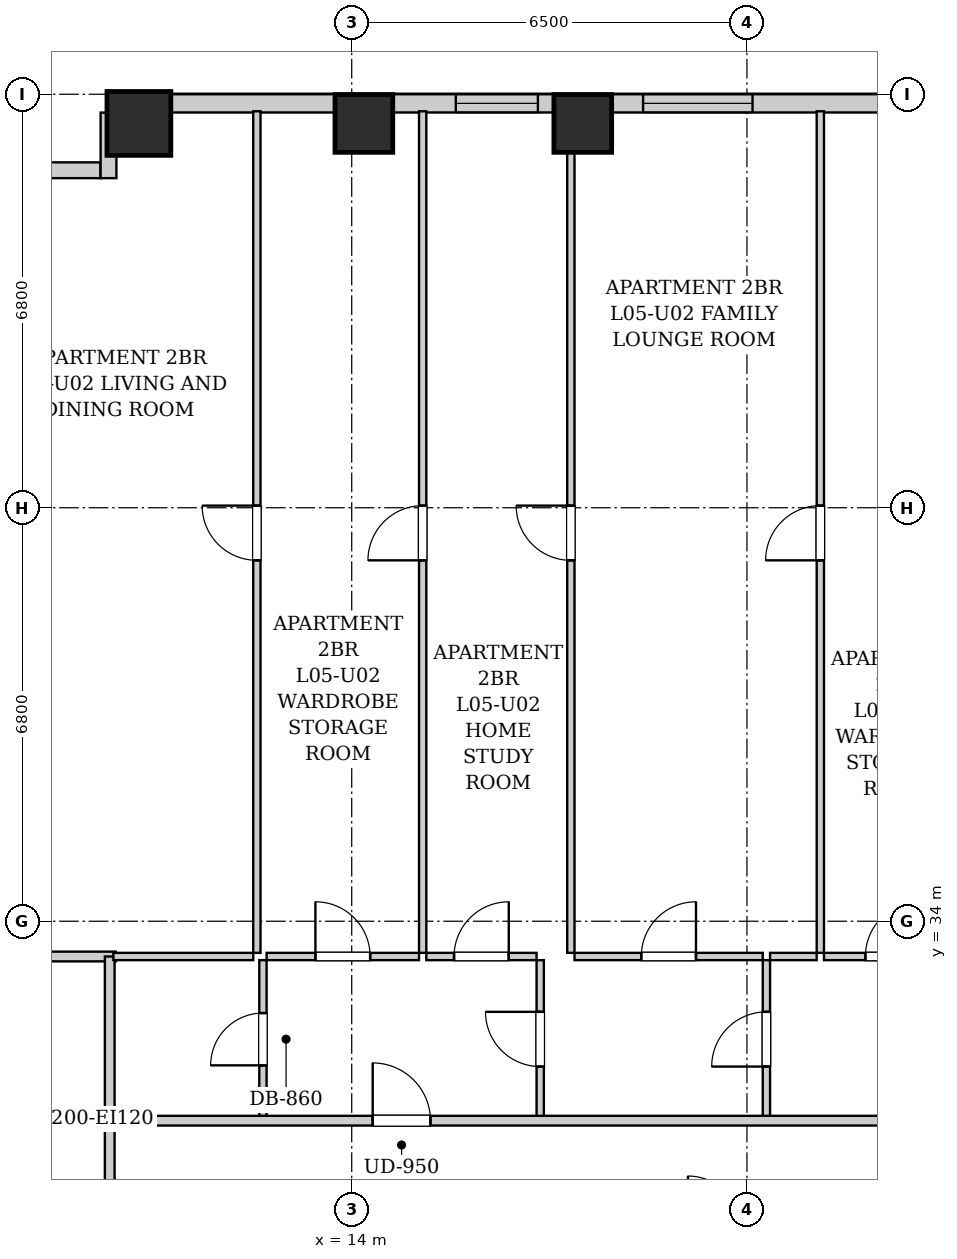
"""IFC4 building model, lengths in metres.
Left out: names, types, materials, properties, quantities, classifications, styles, units other than length and angle.
Written with IfcOpenShell. Run it as: python <this file> out.ifc"""

import sys

from ifc_helpers import new_model, si_unit, direction, frame, frame_2d, origin, origin_2d, place, context, subcontext, project, spatial, rectangle, extrude, element, fill, save


model = new_model("IFC4")
c1 = context("Model", 3, precision=1e-05, world=origin(), true_north=direction((0.0, 1.0)))
c2 = subcontext(c1, "Body", "Model", "MODEL_VIEW")
j1 = project(units=[si_unit("LENGTHUNIT", "METRE"), si_unit("PLANEANGLEUNIT", "RADIAN")], contexts=[c1])
p1 = place(None, origin())
s1 = spatial("IfcSite", under=j1, at=p1, CompositionType="ELEMENT")
p2 = place(p1, origin())
s2 = spatial("IfcBuilding", under=s1, at=p2, CompositionType="ELEMENT")
p3 = place(p2, frame((0.0, 0.0, 25.8)))
s3 = spatial("IfcBuildingStorey", under=s2, at=p3, CompositionType="ELEMENT", Elevation=25.8)
p4 = place(p3, frame((10.5, 47.12, 0.0), z_axis=(0.0, 0.0, 1.0), x_axis=(1.0, 0.0, 0.0)))
e1 = element("IfcColumn", 1, at=p4, inside=s3, PredefinedType="COLUMN", context=c2, shape_type="SweptSolid", body=[
    extrude(rectangle(XDim=1.05, YDim=1.05, at=origin_2d()), origin(), (0.0, 0.0, 1.0), 3.2),
])
for number, where, z_axis, x_axis in (
    (2, (14.2, 47.12, 0.0), (0.0, 0.0, 1.0), (1.0, 0.0, 0.0)),
    (3, (17.8, 47.12, 0.0), (0.0, 0.0, 1.0), (1.0, 0.0, 0.0)),
):
    element("IfcColumn", number, at=place(p3, frame(where, z_axis=z_axis, x_axis=x_axis)), inside=s3, PredefinedType="COLUMN", context=c2, shape_type="SweptSolid", body=[
        extrude(rectangle(XDim=0.95, YDim=0.95, at=origin_2d()), origin(), (0.0, 0.0, 1.0), 3.2),
    ])
p5 = place(p3, frame((10.0, 47.45, 0.0), z_axis=(0.0, 0.0, 1.0), x_axis=(1.0, 0.0, 0.0)))
e4 = element("IfcWall", 4, at=p5, inside=s3, PredefinedType="SOLIDWALL", context=c2, shape_type="SweptSolid", body=[
    extrude(rectangle(XDim=28.1, YDim=0.3, at=frame_2d((14.05, 0.0))), origin(), (0.0, 0.0, 1.0), 1.975),
])
p6 = place(p5, frame((5.712, 0.0, 0.55)))
e5 = element("IfcOpeningElement", 5, at=p6, cuts=e4, PredefinedType="OPENING", context=c2, shape_type="SweptSolid", body=[
    extrude(rectangle(XDim=1.35, YDim=1.2, at=frame_2d((0.675, 0.6))), frame((0.0, 0.16, 0.0), z_axis=(0.0, -1.0, 0.0), x_axis=(1.0, 0.0, 0.0)), (0.0, 0.0, 1.0), 0.32),
])
p7 = place(p5, frame((8.792, 0.0, 0.55)))
e6 = element("IfcOpeningElement", 6, at=p7, cuts=e4, PredefinedType="OPENING", context=c2, shape_type="SweptSolid", body=[
    extrude(rectangle(XDim=1.8, YDim=1.2, at=frame_2d((0.9, 0.6))), frame((0.0, 0.16, 0.0), z_axis=(0.0, -1.0, 0.0), x_axis=(1.0, 0.0, 0.0)), (0.0, 0.0, 1.0), 0.32),
])
p8 = place(p5, frame((18.86, 0.0, 0.55)))
e7 = element("IfcOpeningElement", 7, at=p8, cuts=e4, PredefinedType="OPENING", context=c2, shape_type="SweptSolid", body=[
    extrude(rectangle(XDim=1.8, YDim=1.2, at=frame_2d((0.9, 0.6))), frame((0.0, 0.16, 0.0), z_axis=(0.0, -1.0, 0.0), x_axis=(1.0, 0.0, 0.0)), (0.0, 0.0, 1.0), 0.32),
])
p9 = place(p5, frame((21.215, 0.0, 0.55)))
e8 = element("IfcOpeningElement", 8, at=p9, cuts=e4, PredefinedType="OPENING", context=c2, shape_type="SweptSolid", body=[
    extrude(rectangle(XDim=1.35, YDim=1.2, at=frame_2d((0.675, 0.6))), frame((0.0, 0.16, 0.0), z_axis=(0.0, -1.0, 0.0), x_axis=(1.0, 0.0, 0.0)), (0.0, 0.0, 1.0), 0.32),
])
p10 = place(p5, frame((23.969, 0.0, 0.55)))
e9 = element("IfcOpeningElement", 9, at=p10, cuts=e4, PredefinedType="OPENING", context=c2, shape_type="SweptSolid", body=[
    extrude(rectangle(XDim=1.8, YDim=1.2, at=frame_2d((0.9, 0.6))), frame((0.0, 0.16, 0.0), z_axis=(0.0, -1.0, 0.0), x_axis=(1.0, 0.0, 0.0)), (0.0, 0.0, 1.0), 0.32),
])
p11 = place(p5, frame((26.698, 0.0, 0.55)))
e10 = element("IfcOpeningElement", 10, at=p11, cuts=e4, PredefinedType="OPENING", context=c2, shape_type="SweptSolid", body=[
    extrude(rectangle(XDim=0.85, YDim=1.2, at=frame_2d((0.425, 0.6))), frame((0.0, 0.16, 0.0), z_axis=(0.0, -1.0, 0.0), x_axis=(1.0, 0.0, 0.0)), (0.0, 0.0, 1.0), 0.32),
])
p12 = place(p3, frame((8.882, 46.35, 0.0), z_axis=(0.0, 0.0, 1.0), x_axis=(1.0, 0.0, 0.0)))
e11 = element("IfcWall", 11, at=p12, inside=s3, PredefinedType="SOLIDWALL", context=c2, shape_type="SweptSolid", body=[
    extrude(rectangle(XDim=0.986, YDim=0.26, at=frame_2d((0.493, 0.0))), origin(), (0.0, 0.0, 1.0), 2.94),
])
p13 = place(p3, frame((10.0, 46.22, 0.0), z_axis=(0.0, 0.0, 1.0), x_axis=(0.0, 1.0, 0.0)))
e12 = element("IfcWall", 12, at=p13, inside=s3, PredefinedType="SOLIDWALL", context=c2, shape_type="SweptSolid", body=[
    extrude(rectangle(XDim=1.078, YDim=0.26, at=frame_2d((0.539, 0.0))), origin(), (0.0, 0.0, 1.0), 2.94),
])
p14 = place(p3, frame((10.02, 28.98, 0.0), z_axis=(0.0, 0.0, 1.0), x_axis=(0.0, 1.0, 0.0)))
e13 = element("IfcWall", 13, at=p14, inside=s3, PredefinedType="PARTITIONING", context=c2, shape_type="SweptSolid", body=[
    extrude(rectangle(XDim=1.74, YDim=0.16, at=frame_2d((0.87, 0.0))), origin(), (0.0, 0.0, 1.0), 2.94),
])
p15 = place(p3, frame((7.78, 33.42, 0.0), z_axis=(0.0, 0.0, 1.0), x_axis=(1.0, 0.0, 0.0)))
e14 = element("IfcWall", 14, at=p15, inside=s3, PredefinedType="PARTITIONING", context=c2, shape_type="SweptSolid", body=[
    extrude(rectangle(XDim=2.34, YDim=0.16, at=frame_2d((1.17, 0.0))), origin(), (0.0, 0.0, 1.0), 2.94),
])
p16 = place(p3, frame((10.02, 30.76, 0.0), z_axis=(0.0, 0.0, 1.0), x_axis=(0.0, 1.0, 0.0)))
e15 = element("IfcWall", 15, at=p16, inside=s3, PredefinedType="PARTITIONING", context=c2, shape_type="SweptSolid", body=[
    extrude(rectangle(XDim=2.66, YDim=0.16, at=frame_2d((1.33, 0.0))), origin(), (0.0, 0.0, 1.0), 2.94),
])
p17 = place(p3, frame((12.54, 30.76, 0.0), z_axis=(0.0, 0.0, 1.0), x_axis=(0.0, 1.0, 0.0)))
e16 = element("IfcWall", 16, at=p17, inside=s3, PredefinedType="PARTITIONING", context=c2, shape_type="SweptSolid", body=[
    extrude(rectangle(XDim=2.6, YDim=0.12, at=frame_2d((1.3, 0.0))), origin(), (0.0, 0.0, 1.0), 2.94),
])
p18 = place(p17, frame((0.87, 0.0, 0.0)))
e17 = element("IfcOpeningElement", 17, at=p18, cuts=e16, PredefinedType="OPENING", context=c2, shape_type="SweptSolid", body=[
    extrude(rectangle(XDim=0.86, YDim=2.05, at=frame_2d((0.43, 1.025))), frame((0.0, 0.07, 0.0), z_axis=(0.0, -1.0, 0.0), x_axis=(1.0, 0.0, 0.0)), (0.0, 0.0, 1.0), 0.14),
])
p19 = place(p3, frame((10.08, 33.42, 0.0), z_axis=(0.0, 0.0, 1.0), x_axis=(1.0, 0.0, 0.0)))
e18 = element("IfcWall", 18, at=p19, inside=s3, PredefinedType="PARTITIONING", context=c2, shape_type="SweptSolid", body=[
    extrude(rectangle(XDim=2.3, YDim=0.12, at=frame_2d((1.15, 0.0))), origin(), (0.0, 0.0, 1.0), 2.94),
])
p20 = place(p3, frame((17.1, 30.76, 0.0), z_axis=(0.0, 0.0, 1.0), x_axis=(0.0, 1.0, 0.0)))
e19 = element("IfcWall", 19, at=p20, inside=s3, PredefinedType="PARTITIONING", context=c2, shape_type="SweptSolid", body=[
    extrude(rectangle(XDim=2.6, YDim=0.12, at=frame_2d((1.3, 0.0))), origin(), (0.0, 0.0, 1.0), 2.94),
])
p21 = place(p20, frame((0.85, 0.0, 0.0)))
e20 = element("IfcOpeningElement", 20, at=p21, cuts=e19, PredefinedType="OPENING", context=c2, shape_type="SweptSolid", body=[
    extrude(rectangle(XDim=0.9, YDim=2.05, at=frame_2d((0.45, 1.025))), frame((0.0, 0.07, 0.0), z_axis=(0.0, -1.0, 0.0), x_axis=(1.0, 0.0, 0.0)), (0.0, 0.0, 1.0), 0.14),
])
p22 = place(p3, frame((12.6, 33.42, 0.0), z_axis=(0.0, 0.0, 1.0), x_axis=(1.0, 0.0, 0.0)))
e21 = element("IfcWall", 21, at=p22, inside=s3, PredefinedType="PARTITIONING", context=c2, shape_type="SweptSolid", body=[
    extrude(rectangle(XDim=2.507, YDim=0.12, at=frame_2d((1.253, 0.0))), origin(), (0.0, 0.0, 1.0), 2.94),
])
p23 = place(p22, frame((0.803, 0.0, 0.0)))
e22 = element("IfcOpeningElement", 22, at=p23, cuts=e21, PredefinedType="OPENING", context=c2, shape_type="SweptSolid", body=[
    extrude(rectangle(XDim=0.9, YDim=2.05, at=frame_2d((0.45, 1.025))), frame((0.0, 0.07, 0.0), z_axis=(0.0, -1.0, 0.0), x_axis=(1.0, 0.0, 0.0)), (0.0, 0.0, 1.0), 0.14),
])
p24 = place(p3, frame((15.227, 33.42, 0.0), z_axis=(0.0, 0.0, 1.0), x_axis=(1.0, 0.0, 0.0)))
e23 = element("IfcWall", 23, at=p24, inside=s3, PredefinedType="PARTITIONING", context=c2, shape_type="SweptSolid", body=[
    extrude(rectangle(XDim=1.813, YDim=0.12, at=frame_2d((0.906, 0.0))), origin(), (0.0, 0.0, 1.0), 2.94),
])
p25 = place(p24, frame((0.456, 0.0, 0.0)))
e24 = element("IfcOpeningElement", 24, at=p25, cuts=e23, PredefinedType="OPENING", context=c2, shape_type="SweptSolid", body=[
    extrude(rectangle(XDim=0.9, YDim=2.05, at=frame_2d((0.45, 1.025))), frame((0.0, 0.07, 0.0), z_axis=(0.0, -1.0, 0.0), x_axis=(1.0, 0.0, 0.0)), (0.0, 0.0, 1.0), 0.14),
])
p26 = place(p3, frame((20.82, 30.76, 0.0), z_axis=(0.0, 0.0, 1.0), x_axis=(0.0, 1.0, 0.0)))
e25 = element("IfcWall", 25, at=p26, inside=s3, PredefinedType="PARTITIONING", context=c2, shape_type="SweptSolid", body=[
    extrude(rectangle(XDim=2.6, YDim=0.12, at=frame_2d((1.3, 0.0))), origin(), (0.0, 0.0, 1.0), 2.94),
])
p27 = place(p26, frame((0.85, 0.0, 0.0)))
e26 = element("IfcOpeningElement", 26, at=p27, cuts=e25, PredefinedType="OPENING", context=c2, shape_type="SweptSolid", body=[
    extrude(rectangle(XDim=0.9, YDim=2.05, at=frame_2d((0.45, 1.025))), frame((0.0, 0.07, 0.0), z_axis=(0.0, -1.0, 0.0), x_axis=(1.0, 0.0, 0.0)), (0.0, 0.0, 1.0), 0.14),
])
p28 = place(p3, frame((17.664, 33.42, 0.0), z_axis=(0.0, 0.0, 1.0), x_axis=(1.0, 0.0, 0.0)))
e27 = element("IfcWall", 27, at=p28, inside=s3, PredefinedType="PARTITIONING", context=c2, shape_type="SweptSolid", body=[
    extrude(rectangle(XDim=3.096, YDim=0.12, at=frame_2d((1.548, 0.0))), origin(), (0.0, 0.0, 1.0), 2.94),
])
p29 = place(p28, frame((1.098, 0.0, 0.0)))
e28 = element("IfcOpeningElement", 28, at=p29, cuts=e27, PredefinedType="OPENING", context=c2, shape_type="SweptSolid", body=[
    extrude(rectangle(XDim=0.9, YDim=2.05, at=frame_2d((0.45, 1.025))), frame((0.0, 0.07, 0.0), z_axis=(0.0, -1.0, 0.0), x_axis=(1.0, 0.0, 0.0)), (0.0, 0.0, 1.0), 0.14),
])
p30 = place(p3, frame((20.88, 33.42, 0.0), z_axis=(0.0, 0.0, 1.0), x_axis=(1.0, 0.0, 0.0)))
e29 = element("IfcWall", 29, at=p30, inside=s3, PredefinedType="PARTITIONING", context=c2, shape_type="SweptSolid", body=[
    extrude(rectangle(XDim=0.767, YDim=0.12, at=frame_2d((0.384, 0.0))), origin(), (0.0, 0.0, 1.0), 2.94),
])
p31 = place(p3, frame((21.767, 33.42, 0.0), z_axis=(0.0, 0.0, 1.0), x_axis=(1.0, 0.0, 0.0)))
e30 = element("IfcWall", 30, at=p31, inside=s3, PredefinedType="PARTITIONING", context=c2, shape_type="SweptSolid", body=[
    extrude(rectangle(XDim=2.263, YDim=0.12, at=frame_2d((1.131, 0.0))), origin(), (0.0, 0.0, 1.0), 2.94),
])
p32 = place(p31, frame((0.681, 0.0, 0.0)))
e31 = element("IfcOpeningElement", 31, at=p32, cuts=e30, PredefinedType="OPENING", context=c2, shape_type="SweptSolid", body=[
    extrude(rectangle(XDim=0.9, YDim=2.05, at=frame_2d((0.45, 1.025))), frame((0.0, 0.07, 0.0), z_axis=(0.0, -1.0, 0.0), x_axis=(1.0, 0.0, 0.0)), (0.0, 0.0, 1.0), 0.14),
])
p33 = place(p3, frame((12.44, 33.48, 0.0), z_axis=(0.0, 0.0, 1.0), x_axis=(0.0, 1.0, 0.0)))
e32 = element("IfcWall", 32, at=p33, inside=s3, PredefinedType="PARTITIONING", context=c2, shape_type="SweptSolid", body=[
    extrude(rectangle(XDim=13.84, YDim=0.12, at=frame_2d((6.92, 0.0))), origin(), (0.0, 0.0, 1.0), 2.94),
])
p34 = place(p33, frame((6.455, 0.0, 0.0)))
e33 = element("IfcOpeningElement", 33, at=p34, cuts=e32, PredefinedType="OPENING", context=c2, shape_type="SweptSolid", body=[
    extrude(rectangle(XDim=0.9, YDim=2.05, at=frame_2d((0.45, 1.025))), frame((0.0, 0.07, 0.0), z_axis=(0.0, -1.0, 0.0), x_axis=(1.0, 0.0, 0.0)), (0.0, 0.0, 1.0), 0.14),
])
p35 = place(p3, frame((15.167, 33.48, 0.0), z_axis=(0.0, 0.0, 1.0), x_axis=(0.0, 1.0, 0.0)))
e34 = element("IfcWall", 34, at=p35, inside=s3, PredefinedType="PARTITIONING", context=c2, shape_type="SweptSolid", body=[
    extrude(rectangle(XDim=13.84, YDim=0.12, at=frame_2d((6.92, 0.0))), origin(), (0.0, 0.0, 1.0), 2.94),
])
p36 = place(p35, frame((6.455, 0.0, 0.0)))
e35 = element("IfcOpeningElement", 35, at=p36, cuts=e34, PredefinedType="OPENING", context=c2, shape_type="SweptSolid", body=[
    extrude(rectangle(XDim=0.9, YDim=2.05, at=frame_2d((0.45, 1.025))), frame((0.0, 0.07, 0.0), z_axis=(0.0, -1.0, 0.0), x_axis=(1.0, 0.0, 0.0)), (0.0, 0.0, 1.0), 0.14),
])
p37 = place(p3, frame((17.604, 33.48, 0.0), z_axis=(0.0, 0.0, 1.0), x_axis=(0.0, 1.0, 0.0)))
e36 = element("IfcWall", 36, at=p37, inside=s3, PredefinedType="PARTITIONING", context=c2, shape_type="SweptSolid", body=[
    extrude(rectangle(XDim=13.84, YDim=0.12, at=frame_2d((6.92, 0.0))), origin(), (0.0, 0.0, 1.0), 2.94),
])
p38 = place(p37, frame((6.455, 0.0, 0.0)))
e37 = element("IfcOpeningElement", 37, at=p38, cuts=e36, PredefinedType="OPENING", context=c2, shape_type="SweptSolid", body=[
    extrude(rectangle(XDim=0.9, YDim=2.05, at=frame_2d((0.45, 1.025))), frame((0.0, 0.07, 0.0), z_axis=(0.0, -1.0, 0.0), x_axis=(1.0, 0.0, 0.0)), (0.0, 0.0, 1.0), 0.14),
])
p39 = place(p3, frame((21.707, 33.48, 0.0), z_axis=(0.0, 0.0, 1.0), x_axis=(0.0, 1.0, 0.0)))
e38 = element("IfcWall", 38, at=p39, inside=s3, PredefinedType="PARTITIONING", context=c2, shape_type="SweptSolid", body=[
    extrude(rectangle(XDim=13.84, YDim=0.12, at=frame_2d((6.92, 0.0))), origin(), (0.0, 0.0, 1.0), 2.94),
])
p40 = place(p39, frame((6.455, 0.0, 0.0)))
e39 = element("IfcOpeningElement", 39, at=p40, cuts=e38, PredefinedType="OPENING", context=c2, shape_type="SweptSolid", body=[
    extrude(rectangle(XDim=0.9, YDim=2.05, at=frame_2d((0.45, 1.025))), frame((0.0, 0.07, 0.0), z_axis=(0.0, -1.0, 0.0), x_axis=(1.0, 0.0, 0.0)), (0.0, 0.0, 1.0), 0.14),
])
p41 = place(p3, frame((10.05, 30.72, 0.0), z_axis=(0.0, 0.0, 1.0), x_axis=(1.0, 0.0, 0.0)))
e40 = element("IfcWall", 40, at=p41, inside=s3, PredefinedType="PARTITIONING", context=c2, shape_type="SweptSolid", body=[
    extrude(rectangle(XDim=33.9, YDim=0.16, at=frame_2d((16.95, 0.0))), origin(), (0.0, 0.0, 1.0), 2.94),
])
p42 = place(p41, frame((4.295, 0.0, 0.0)))
e41 = element("IfcOpeningElement", 41, at=p42, cuts=e40, PredefinedType="OPENING", context=c2, shape_type="SweptSolid", body=[
    extrude(rectangle(XDim=0.95, YDim=2.1, at=frame_2d((0.475, 1.05))), frame((0.0, 0.09, 0.0), z_axis=(0.0, -1.0, 0.0), x_axis=(1.0, 0.0, 0.0)), (0.0, 0.0, 1.0), 0.18),
])
p43 = place(p41, frame((27.235, 0.0, 0.0)))
e42 = element("IfcOpeningElement", 42, at=p43, cuts=e40, PredefinedType="OPENING", context=c2, shape_type="SweptSolid", body=[
    extrude(rectangle(XDim=0.95, YDim=2.1, at=frame_2d((0.475, 1.05))), frame((0.0, 0.09, 0.0), z_axis=(0.0, -1.0, 0.0), x_axis=(1.0, 0.0, 0.0)), (0.0, 0.0, 1.0), 0.18),
])
p44 = place(p18, origin())
e43 = element("IfcDoor", 43, at=p44, inside=s3, OperationType="SINGLE_SWING_LEFT", PredefinedType="DOOR", context=c2, shape_type="SweptSolid", body=[
    extrude(rectangle(XDim=0.86, YDim=2.05, at=frame_2d((0.43, 1.025))), frame((0.0, 0.025, 0.0), z_axis=(0.0, -1.0, 0.0), x_axis=(1.0, 0.0, 0.0)), (0.0, 0.0, 1.0), 0.05),
])
fill(e17, e43)
p45 = place(p21, origin())
e44 = element("IfcDoor", 44, at=p45, inside=s3, OperationType="SINGLE_SWING_RIGHT", PredefinedType="DOOR", context=c2, shape_type="SweptSolid", body=[
    extrude(rectangle(XDim=0.9, YDim=2.05, at=frame_2d((0.45, 1.025))), frame((0.0, 0.025, 0.0), z_axis=(0.0, -1.0, 0.0), x_axis=(1.0, 0.0, 0.0)), (0.0, 0.0, 1.0), 0.05),
])
fill(e20, e44)
p46 = place(p23, origin())
e45 = element("IfcDoor", 45, at=p46, inside=s3, OperationType="SINGLE_SWING_LEFT", PredefinedType="DOOR", context=c2, shape_type="SweptSolid", body=[
    extrude(rectangle(XDim=0.9, YDim=2.05, at=frame_2d((0.45, 1.025))), frame((0.0, 0.025, 0.0), z_axis=(0.0, -1.0, 0.0), x_axis=(1.0, 0.0, 0.0)), (0.0, 0.0, 1.0), 0.05),
])
fill(e22, e45)
p47 = place(p25, origin())
e46 = element("IfcDoor", 46, at=p47, inside=s3, OperationType="SINGLE_SWING_RIGHT", PredefinedType="DOOR", context=c2, shape_type="SweptSolid", body=[
    extrude(rectangle(XDim=0.9, YDim=2.05, at=frame_2d((0.45, 1.025))), frame((0.0, 0.025, 0.0), z_axis=(0.0, -1.0, 0.0), x_axis=(1.0, 0.0, 0.0)), (0.0, 0.0, 1.0), 0.05),
])
fill(e24, e46)
p48 = place(p27, origin())
e47 = element("IfcDoor", 47, at=p48, inside=s3, OperationType="SINGLE_SWING_LEFT", PredefinedType="DOOR", context=c2, shape_type="SweptSolid", body=[
    extrude(rectangle(XDim=0.9, YDim=2.05, at=frame_2d((0.45, 1.025))), frame((0.0, 0.025, 0.0), z_axis=(0.0, -1.0, 0.0), x_axis=(1.0, 0.0, 0.0)), (0.0, 0.0, 1.0), 0.05),
])
fill(e26, e47)
p49 = place(p29, origin())
e48 = element("IfcDoor", 48, at=p49, inside=s3, OperationType="SINGLE_SWING_RIGHT", PredefinedType="DOOR", context=c2, shape_type="SweptSolid", body=[
    extrude(rectangle(XDim=0.9, YDim=2.05, at=frame_2d((0.45, 1.025))), frame((0.0, 0.025, 0.0), z_axis=(0.0, -1.0, 0.0), x_axis=(1.0, 0.0, 0.0)), (0.0, 0.0, 1.0), 0.05),
])
fill(e28, e48)
p50 = place(p32, origin())
e49 = element("IfcDoor", 49, at=p50, inside=s3, OperationType="SINGLE_SWING_RIGHT", PredefinedType="DOOR", context=c2, shape_type="SweptSolid", body=[
    extrude(rectangle(XDim=0.9, YDim=2.05, at=frame_2d((0.45, 1.025))), frame((0.0, 0.025, 0.0), z_axis=(0.0, -1.0, 0.0), x_axis=(1.0, 0.0, 0.0)), (0.0, 0.0, 1.0), 0.05),
])
fill(e31, e49)
p51 = place(p34, origin())
e50 = element("IfcDoor", 50, at=p51, inside=s3, OperationType="SINGLE_SWING_RIGHT", PredefinedType="DOOR", context=c2, shape_type="SweptSolid", body=[
    extrude(rectangle(XDim=0.9, YDim=2.05, at=frame_2d((0.45, 1.025))), frame((0.0, 0.025, 0.0), z_axis=(0.0, -1.0, 0.0), x_axis=(1.0, 0.0, 0.0)), (0.0, 0.0, 1.0), 0.05),
])
fill(e33, e50)
p52 = place(p36, origin())
e51 = element("IfcDoor", 51, at=p52, inside=s3, OperationType="SINGLE_SWING_LEFT", PredefinedType="DOOR", context=c2, shape_type="SweptSolid", body=[
    extrude(rectangle(XDim=0.9, YDim=2.05, at=frame_2d((0.45, 1.025))), frame((0.0, 0.025, 0.0), z_axis=(0.0, -1.0, 0.0), x_axis=(1.0, 0.0, 0.0)), (0.0, 0.0, 1.0), 0.05),
])
fill(e35, e51)
p53 = place(p38, origin())
e52 = element("IfcDoor", 52, at=p53, inside=s3, OperationType="SINGLE_SWING_RIGHT", PredefinedType="DOOR", context=c2, shape_type="SweptSolid", body=[
    extrude(rectangle(XDim=0.9, YDim=2.05, at=frame_2d((0.45, 1.025))), frame((0.0, 0.025, 0.0), z_axis=(0.0, -1.0, 0.0), x_axis=(1.0, 0.0, 0.0)), (0.0, 0.0, 1.0), 0.05),
])
fill(e37, e52)
p54 = place(p40, origin())
e53 = element("IfcDoor", 53, at=p54, inside=s3, OperationType="SINGLE_SWING_LEFT", PredefinedType="DOOR", context=c2, shape_type="SweptSolid", body=[
    extrude(rectangle(XDim=0.9, YDim=2.05, at=frame_2d((0.45, 1.025))), frame((0.0, 0.025, 0.0), z_axis=(0.0, -1.0, 0.0), x_axis=(1.0, 0.0, 0.0)), (0.0, 0.0, 1.0), 0.05),
])
fill(e39, e53)
p55 = place(p42, origin())
e54 = element("IfcDoor", 54, at=p55, inside=s3, OperationType="SINGLE_SWING_LEFT", PredefinedType="DOOR", context=c2, shape_type="SweptSolid", body=[
    extrude(rectangle(XDim=0.95, YDim=2.1, at=frame_2d((0.475, 1.05))), frame((0.0, 0.025, 0.0), z_axis=(0.0, -1.0, 0.0), x_axis=(1.0, 0.0, 0.0)), (0.0, 0.0, 1.0), 0.05),
])
fill(e41, e54)
p56 = place(p6, origin())
e55 = element("IfcWindow", 55, at=p56, inside=s3, PartitioningType="SINGLE_PANEL", PredefinedType="WINDOW", context=c2, shape_type="SweptSolid", body=[
    extrude(rectangle(XDim=1.35, YDim=1.2, at=frame_2d((0.675, 0.6))), frame((0.0, 0.03, 0.0), z_axis=(0.0, -1.0, 0.0), x_axis=(1.0, 0.0, 0.0)), (0.0, 0.0, 1.0), 0.06),
])
fill(e5, e55)
p57 = place(p7, origin())
e56 = element("IfcWindow", 56, at=p57, inside=s3, PartitioningType="DOUBLE_PANEL_VERTICAL", PredefinedType="WINDOW", context=c2, shape_type="SweptSolid", body=[
    extrude(rectangle(XDim=1.8, YDim=1.2, at=frame_2d((0.9, 0.6))), frame((0.0, 0.03, 0.0), z_axis=(0.0, -1.0, 0.0), x_axis=(1.0, 0.0, 0.0)), (0.0, 0.0, 1.0), 0.06),
])
fill(e6, e56)
save(model, sys.argv[1])
